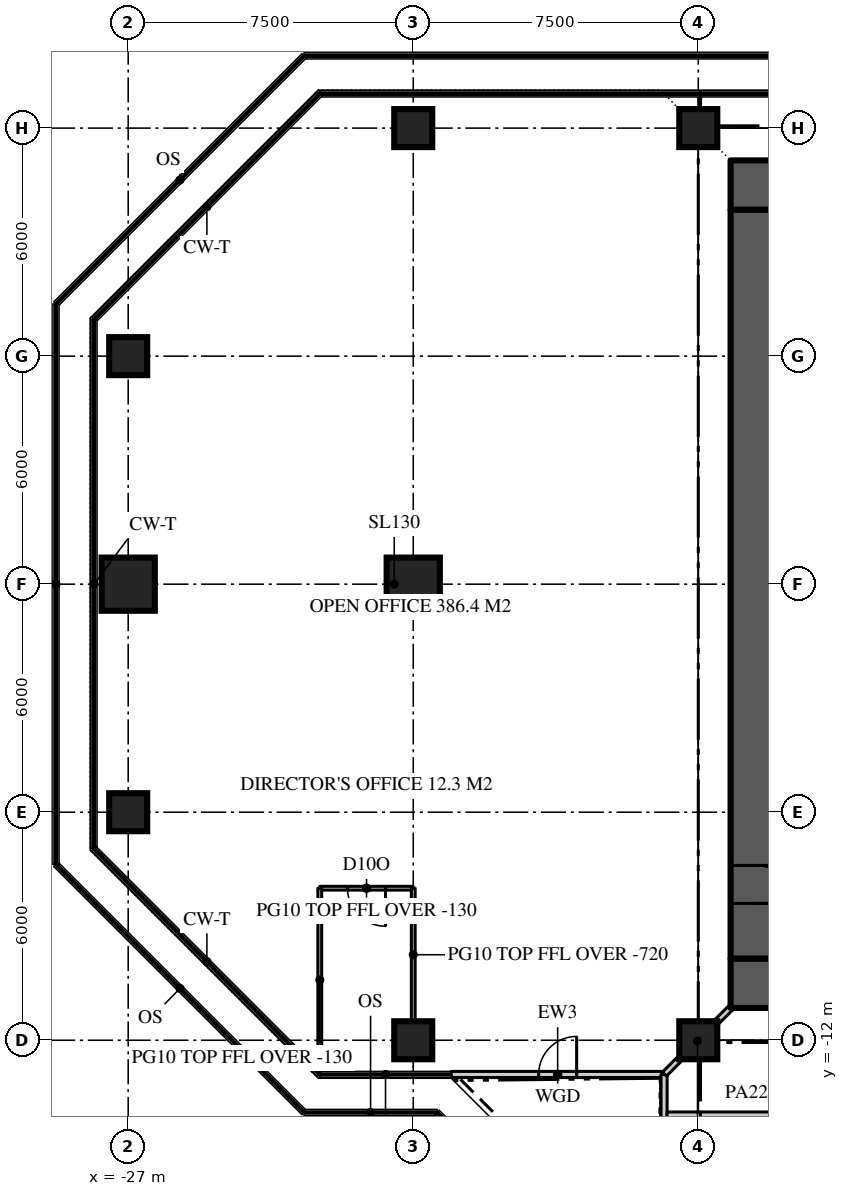
"""IFC4 building model, lengths in metres.
Left out: names, types, materials, properties, quantities, classifications, styles, units other than length and angle.
Written with IfcOpenShell. Run it as: python <this file> out.ifc"""

import sys

from ifc_helpers import new_model, si_unit, direction, frame, frame_2d, origin, origin_2d, place, context, subcontext, project, spatial, rectangle, extrude, element, fill, save


model = new_model("IFC4")
c1 = context("Model", 3, precision=1e-05, world=origin(), true_north=direction((0.0, 1.0)))
c2 = subcontext(c1, "Body", "Model", "MODEL_VIEW")
j1 = project(units=[si_unit("LENGTHUNIT", "METRE"), si_unit("PLANEANGLEUNIT", "RADIAN")], contexts=[c1])
p1 = place(None, origin())
s1 = spatial("IfcSite", under=j1, at=p1, CompositionType="ELEMENT")
p2 = place(p1, origin())
s2 = spatial("IfcBuilding", under=s1, at=p2, CompositionType="ELEMENT")
p3 = place(p2, frame((0.0, 0.0, 279.0)))
s3 = spatial("IfcBuildingStorey", under=s2, at=p3, CompositionType="ELEMENT", Elevation=279.0)
p4 = place(p3, frame((-11.15, 10.5, 0.0), z_axis=(0.0, 0.0, 1.0), x_axis=(1.0, 0.0, 0.0)))
e1 = element("IfcWall", 1, at=p4, inside=s3, PredefinedType="SHEAR", context=c2, shape_type="SweptSolid", body=[
    extrude(rectangle(XDim=22.3, YDim=1.3, at=frame_2d((11.15, 0.0))), origin(), (0.0, 0.0, 1.0), 3.9),
])
p5 = place(p4, frame((4.25, 0.0, 0.0)))
e2 = element("IfcOpeningElement", 2, at=p5, cuts=e1, PredefinedType="OPENING", context=c2, shape_type="SweptSolid", body=[
    extrude(rectangle(XDim=1.8, YDim=2.2, at=frame_2d((0.9, 1.1))), frame((0.0, 0.66, 0.0), z_axis=(0.0, -1.0, 0.0), x_axis=(1.0, 0.0, 0.0)), (0.0, 0.0, 1.0), 1.32),
])
p6 = place(p4, frame((16.25, 0.0, 0.0)))
e3 = element("IfcOpeningElement", 3, at=p6, cuts=e1, PredefinedType="OPENING", context=c2, shape_type="SweptSolid", body=[
    extrude(rectangle(XDim=1.8, YDim=2.2, at=frame_2d((0.9, 1.1))), frame((0.0, 0.66, 0.0), z_axis=(0.0, -1.0, 0.0), x_axis=(1.0, 0.0, 0.0)), (0.0, 0.0, 1.0), 1.32),
])
p7 = place(p3, frame((11.15, -10.5, 0.0), z_axis=(0.0, 0.0, 1.0), x_axis=(-1.0, 0.0, 0.0)))
e4 = element("IfcWall", 4, at=p7, inside=s3, PredefinedType="SHEAR", context=c2, shape_type="SweptSolid", body=[
    extrude(rectangle(XDim=22.3, YDim=1.3, at=frame_2d((11.15, 0.0))), origin(), (0.0, 0.0, 1.0), 3.9),
])
p8 = place(p7, frame((16.25, 0.0, 0.0)))
e5 = element("IfcOpeningElement", 5, at=p8, cuts=e4, PredefinedType="OPENING", context=c2, shape_type="SweptSolid", body=[
    extrude(rectangle(XDim=1.8, YDim=2.2, at=frame_2d((0.9, 1.1))), frame((0.0, 0.66, 0.0), z_axis=(0.0, -1.0, 0.0), x_axis=(1.0, 0.0, 0.0)), (0.0, 0.0, 1.0), 1.32),
])
p9 = place(p7, frame((4.25, 0.0, 0.0)))
e6 = element("IfcOpeningElement", 6, at=p9, cuts=e4, PredefinedType="OPENING", context=c2, shape_type="SweptSolid", body=[
    extrude(rectangle(XDim=1.8, YDim=2.2, at=frame_2d((0.9, 1.1))), frame((0.0, 0.66, 0.0), z_axis=(0.0, -1.0, 0.0), x_axis=(1.0, 0.0, 0.0)), (0.0, 0.0, 1.0), 1.32),
])
p10 = place(p3, frame((-10.5, 9.85, 0.0), z_axis=(0.0, 0.0, 1.0), x_axis=(0.0, -1.0, 0.0)))
e7 = element("IfcWall", 7, at=p10, inside=s3, PredefinedType="SHEAR", context=c2, shape_type="SweptSolid", body=[
    extrude(rectangle(XDim=19.7, YDim=1.3, at=frame_2d((9.85, 0.0))), origin(), (0.0, 0.0, 1.0), 3.9),
])
p11 = place(p10, frame((17.25, 0.0, 0.0)))
e8 = element("IfcOpeningElement", 8, at=p11, cuts=e7, PredefinedType="OPENING", context=c2, shape_type="SweptSolid", body=[
    extrude(rectangle(XDim=1.0, YDim=2.2, at=frame_2d((0.5, 1.1))), frame((0.0, 0.66, 0.0), z_axis=(0.0, -1.0, 0.0), x_axis=(1.0, 0.0, 0.0)), (0.0, 0.0, 1.0), 1.32),
])
for number, where, z_axis, x_axis in (
    (9, (-19.5, -12.0, 0.0), (0.0, 0.0, 1.0), (1.0, 0.0, 0.0)),
    (10, (-12.0, -12.0, 0.0), (0.0, 0.0, 1.0), (1.0, 0.0, 0.0)),
    (11, (-27.0, -6.0, 0.0), (0.0, 0.0, 1.0), (1.0, 0.0, 0.0)),
):
    element("IfcColumn", number, at=place(p3, frame(where, z_axis=z_axis, x_axis=x_axis)), inside=s3, PredefinedType="COLUMN", context=c2, shape_type="SweptSolid", body=[
        extrude(rectangle(XDim=1.0, YDim=1.0, at=origin_2d()), origin(), (0.0, 0.0, 1.0), 3.9),
    ])
for number, where, z_axis, x_axis in (
    (12, (-27.0, 0.0, 0.0), (0.0, 0.0, 1.0), (1.0, 0.0, 0.0)),
    (13, (-19.5, 0.0, 0.0), (0.0, 0.0, 1.0), (1.0, 0.0, 0.0)),
):
    element("IfcColumn", number, at=place(p3, frame(where, z_axis=z_axis, x_axis=x_axis)), inside=s3, PredefinedType="COLUMN", context=c2, shape_type="SweptSolid", body=[
        extrude(rectangle(XDim=1.4, YDim=1.4, at=origin_2d()), origin(), (0.0, 0.0, 1.0), 3.9),
    ])
for number, where, z_axis, x_axis in (
    (14, (-27.0, 6.0, 0.0), (0.0, 0.0, 1.0), (1.0, 0.0, 0.0)),
    (15, (-19.5, 12.0, 0.0), (0.0, 0.0, 1.0), (1.0, 0.0, 0.0)),
    (16, (-12.0, 12.0, 0.0), (0.0, 0.0, 1.0), (1.0, 0.0, 0.0)),
):
    element("IfcColumn", number, at=place(p3, frame(where, z_axis=z_axis, x_axis=x_axis)), inside=s3, PredefinedType="COLUMN", context=c2, shape_type="SweptSolid", body=[
        extrude(rectangle(XDim=1.0, YDim=1.0, at=origin_2d()), origin(), (0.0, 0.0, 1.0), 3.9),
    ])
p12 = place(p3, frame((-18.5, -12.9, 0.0), z_axis=(0.0, 0.0, 1.0), x_axis=(1.0, 0.0, 0.0)))
e17 = element("IfcWall", 17, at=p12, inside=s3, PredefinedType="SOLIDWALL", context=c2, shape_type="SweptSolid", body=[
    extrude(rectangle(XDim=5.6, YDim=0.16, at=frame_2d((2.8, 0.0))), origin(), (0.0, 0.0, 1.0), 3.77),
])
p13 = place(p12, frame((2.3, 0.0, 0.0)))
e18 = element("IfcOpeningElement", 18, at=p13, cuts=e17, PredefinedType="OPENING", context=c2, shape_type="SweptSolid", body=[
    extrude(rectangle(XDim=1.0, YDim=2.2, at=frame_2d((0.5, 1.1))), frame((0.0, 0.09, 0.0), z_axis=(0.0, -1.0, 0.0), x_axis=(1.0, 0.0, 0.0)), (0.0, 0.0, 1.0), 0.18),
])
p14 = place(p3, frame((-12.9, -12.9, 0.0), z_axis=(0.0, 0.0, 1.0), x_axis=(0.0, -1.0, 0.0)))
e19 = element("IfcWall", 19, at=p14, inside=s3, PredefinedType="SOLIDWALL", context=c2, shape_type="SweptSolid", body=[
    extrude(rectangle(XDim=5.6, YDim=0.16, at=frame_2d((2.8, 0.0))), origin(), (0.0, 0.0, 1.0), 3.77),
])
p15 = place(p3, frame((-19.5, -8.0, 0.0), z_axis=(0.0, 0.0, 1.0), x_axis=(-1.0, 0.0, 0.0)))
e20 = element("IfcWall", 20, at=p15, inside=s3, PredefinedType="PARTITIONING", context=c2, shape_type="SweptSolid", body=[
    extrude(rectangle(XDim=2.459, YDim=0.1, at=frame_2d((1.229, 0.0))), origin(), (0.0, 0.0, 1.0), 3.77),
])
p16 = place(p15, frame((0.729, 0.0, 0.0)))
e21 = element("IfcOpeningElement", 21, at=p16, cuts=e20, PredefinedType="OPENING", context=c2, shape_type="SweptSolid", body=[
    extrude(rectangle(XDim=1.0, YDim=2.2, at=frame_2d((0.5, 1.1))), frame((0.0, 0.06, 0.0), z_axis=(0.0, -1.0, 0.0), x_axis=(1.0, 0.0, 0.0)), (0.0, 0.0, 1.0), 0.12),
])
p17 = place(p3, frame((-19.5, -8.0, 0.0), z_axis=(0.0, 0.0, 1.0), x_axis=(0.0, -1.0, 0.0)))
e22 = element("IfcWall", 22, at=p17, inside=s3, PredefinedType="PARTITIONING", context=c2, shape_type="SweptSolid", body=[
    extrude(rectangle(XDim=3.5, YDim=0.1, at=frame_2d((1.75, 0.0))), origin(), (0.0, 0.0, 1.0), 3.18),
])
p18 = place(p3, frame((-21.959, -8.0, 0.0), z_axis=(0.0, 0.0, 1.0), x_axis=(0.0, -1.0, 0.0)))
e23 = element("IfcWall", 23, at=p18, inside=s3, PredefinedType="PARTITIONING", context=c2, shape_type="SweptSolid", body=[
    extrude(rectangle(XDim=4.82, YDim=0.1, at=frame_2d((2.41, 0.0))), origin(), (0.0, 0.0, 1.0), 3.77),
])
p19 = place(p3, frame((-4.0, -14.0, 0.0), z_axis=(0.0, 0.0, 1.0), x_axis=(-1.0, 0.0, 0.0)))
e24 = element("IfcWall", 24, at=p19, inside=s3, PredefinedType="PARTITIONING", context=c2, shape_type="SweptSolid", body=[
    extrude(rectangle(XDim=8.82, YDim=0.225, at=frame_2d((4.41, 0.0))), origin(), (0.0, 0.0, 1.0), 3.18),
])
p20 = place(p3, frame((-11.15, -11.15, 0.0), z_axis=(0.0, 0.0, 1.0), x_axis=(-0.707106781187, -0.707106781187, 0.0)))
e25 = element("IfcWall", 25, at=p20, inside=s3, PredefinedType="PARTITIONING", context=c2, shape_type="SweptSolid", body=[
    extrude(rectangle(XDim=2.461, YDim=0.15, at=frame_2d((1.23, 0.0))), origin(), (0.0, 0.0, 1.0), 3.22),
])
p21 = place(p13, origin())
e26 = element("IfcDoor", 26, at=p21, inside=s3, OperationType="SINGLE_SWING_RIGHT", PredefinedType="DOOR", context=c2, shape_type="SweptSolid", body=[
    extrude(rectangle(XDim=1.0, YDim=2.2, at=frame_2d((0.5, 1.1))), frame((0.0, 0.025, 0.0), z_axis=(0.0, -1.0, 0.0), x_axis=(1.0, 0.0, 0.0)), (0.0, 0.0, 1.0), 0.05),
])
fill(e18, e26)
p22 = place(p11, origin())
e27 = element("IfcDoor", 27, at=p22, inside=s3, OperationType="SINGLE_SWING_RIGHT", PredefinedType="DOOR", context=c2, shape_type="SweptSolid", body=[
    extrude(rectangle(XDim=1.0, YDim=2.2, at=frame_2d((0.5, 1.1))), frame((0.0, 0.025, 0.0), z_axis=(0.0, -1.0, 0.0), x_axis=(1.0, 0.0, 0.0)), (0.0, 0.0, 1.0), 0.05),
])
fill(e8, e27)
p23 = place(p16, origin())
e28 = element("IfcDoor", 28, at=p23, inside=s3, OperationType="SINGLE_SWING_LEFT", PredefinedType="DOOR", context=c2, shape_type="SweptSolid", body=[
    extrude(rectangle(XDim=1.0, YDim=2.2, at=frame_2d((0.5, 1.1))), frame((0.0, 0.025, 0.0), z_axis=(0.0, -1.0, 0.0), x_axis=(1.0, 0.0, 0.0)), (0.0, 0.0, 1.0), 0.05),
])
fill(e21, e28)
save(model, sys.argv[1])
